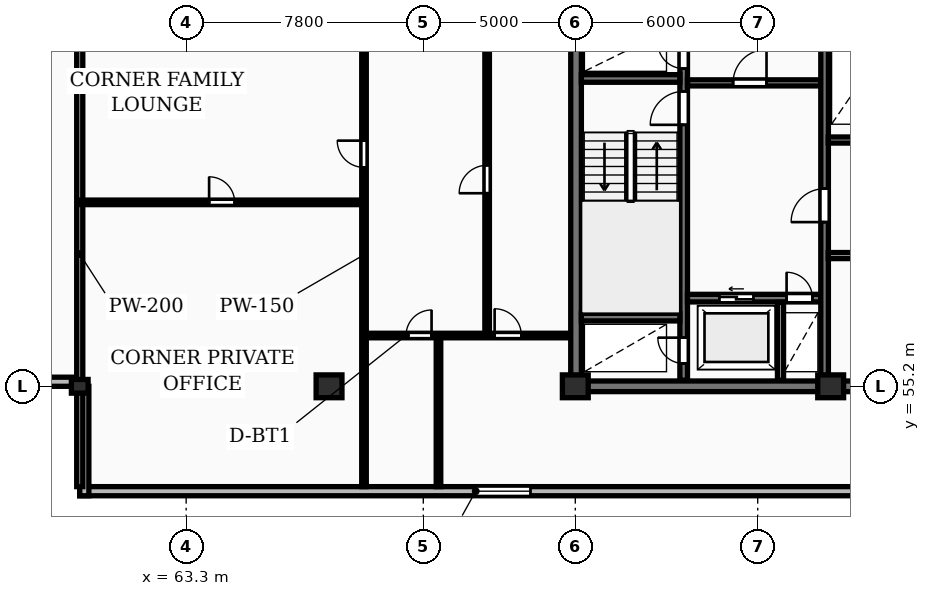
"""IFC4 building model, lengths in metres.
Left out: names, types, materials, properties, quantities, classifications, styles, units other than length and angle.
Written with IfcOpenShell. Run it as: python <this file> out.ifc"""

import sys

from ifc_helpers import new_model, si_unit, direction, frame, frame_2d, origin, origin_2d, place, context, subcontext, project, spatial, rectangle, extrude, element, fill, save


model = new_model("IFC4")
c1 = context("Model", 3, precision=1e-05, world=origin(), true_north=direction((0.0, 1.0)))
c2 = subcontext(c1, "Body", "Model", "MODEL_VIEW")
j1 = project(units=[si_unit("LENGTHUNIT", "METRE"), si_unit("PLANEANGLEUNIT", "RADIAN")], contexts=[c1])
p1 = place(None, origin())
s1 = spatial("IfcSite", under=j1, at=p1, CompositionType="ELEMENT")
p2 = place(p1, origin())
s2 = spatial("IfcBuilding", under=s1, at=p2, CompositionType="ELEMENT")
p3 = place(p2, frame((0.0, 0.0, 204.35)))
s3 = spatial("IfcBuildingStorey", under=s2, at=p3, CompositionType="ELEMENT", Elevation=204.35)
p4 = place(p3, frame((59.8, 55.2, 0.0), z_axis=(0.0, 0.0, 1.0), x_axis=(1.0, 0.0, 0.0)))
e1 = element("IfcColumn", 1, at=p4, inside=s3, PredefinedType="PILASTER", context=c2, shape_type="SweptSolid", body=[
    extrude(rectangle(XDim=0.55, YDim=0.45, at=origin_2d()), origin(), (0.0, 0.0, 1.0), 3.25),
])
for number, where, z_axis, x_axis in (
    (2, (68.0, 55.2, 0.0), (0.0, 0.0, 1.0), (1.0, 0.0, 0.0)),
    (3, (76.1, 55.2, 0.0), (0.0, 0.0, 1.0), (1.0, 0.0, 0.0)),
    (4, (84.5, 55.2, 0.0), (0.0, 0.0, 1.0), (1.0, 0.0, 0.0)),
):
    element("IfcColumn", number, at=place(p3, frame(where, z_axis=z_axis, x_axis=x_axis)), inside=s3, PredefinedType="COLUMN", context=c2, shape_type="SweptSolid", body=[
        extrude(rectangle(XDim=0.85, YDim=0.75, at=origin_2d()), origin(), (0.0, 0.0, 1.0), 3.25),
    ])
p5 = place(p3, frame((59.8, 51.75, 0.0), z_axis=(0.0, 0.0, 1.0), x_axis=(1.0, 0.0, 0.0)))
e5 = element("IfcWall", 5, at=p5, inside=s3, PredefinedType="STANDARD", context=c2, shape_type="SweptSolid", body=[
    extrude(rectangle(XDim=68.6, YDim=0.3, at=frame_2d((34.3, 0.0))), origin(), (0.0, 0.0, 1.0), 2.98),
])
p6 = place(p5, frame((13.025, 0.0, 0.85)))
e6 = element("IfcOpeningElement", 6, at=p6, cuts=e5, PredefinedType="OPENING", context=c2, shape_type="SweptSolid", body=[
    extrude(rectangle(XDim=1.8, YDim=1.8, at=frame_2d((0.9, 0.9))), frame((0.0, 0.16, 0.0), z_axis=(0.0, -1.0, 0.0), x_axis=(1.0, 0.0, 0.0)), (0.0, 0.0, 1.0), 0.32),
])
p7 = place(p5, frame((56.375, 0.0, 0.85)))
e7 = element("IfcOpeningElement", 7, at=p7, cuts=e5, PredefinedType="OPENING", context=c2, shape_type="SweptSolid", body=[
    extrude(rectangle(XDim=1.8, YDim=1.8, at=frame_2d((0.9, 0.9))), frame((0.0, 0.16, 0.0), z_axis=(0.0, -1.0, 0.0), x_axis=(1.0, 0.0, 0.0)), (0.0, 0.0, 1.0), 0.32),
])
p8 = place(p3, frame((56.2, 55.35, 0.0), z_axis=(0.0, 0.0, 1.0), x_axis=(1.0, 0.0, 0.0)))
e8 = element("IfcWall", 8, at=p8, inside=s3, PredefinedType="STANDARD", context=c2, shape_type="SweptSolid", body=[
    extrude(rectangle(XDim=3.6, YDim=0.3, at=frame_2d((1.8, 0.0))), origin(), (0.0, 0.0, 1.0), 2.98),
])
p9 = place(p3, frame((59.95, 55.2, 0.0), z_axis=(0.0, 0.0, 1.0), x_axis=(0.0, -1.0, 0.0)))
e9 = element("IfcWall", 9, at=p9, inside=s3, PredefinedType="STANDARD", context=c2, shape_type="SweptSolid", body=[
    extrude(rectangle(XDim=3.6, YDim=0.3, at=frame_2d((1.8, 0.0))), origin(), (0.0, 0.0, 1.0), 2.98),
])
p10 = place(p3, frame((75.95, 55.2, 0.0), z_axis=(0.0, 0.0, 1.0), x_axis=(1.0, 0.0, 0.0)))
e10 = element("IfcWall", 10, at=p10, inside=s3, PredefinedType="SHEAR", context=c2, shape_type="SweptSolid", body=[
    extrude(rectangle(XDim=36.3, YDim=0.35, at=frame_2d((18.15, 0.0))), origin(), (0.0, 0.0, 1.0), 3.25),
])
p11 = place(p3, frame((76.125, 55.375, 0.0), z_axis=(0.0, 0.0, 1.0), x_axis=(0.0, 1.0, 0.0)))
e11 = element("IfcWall", 11, at=p11, inside=s3, PredefinedType="SHEAR", context=c2, shape_type="SweptSolid", body=[
    extrude(rectangle(XDim=11.65, YDim=0.35, at=frame_2d((5.825, 0.0))), origin(), (0.0, 0.0, 1.0), 3.25),
])
p12 = place(p3, frame((79.665, 55.4, 0.0), z_axis=(0.0, 0.0, 1.0), x_axis=(0.0, 1.0, 0.0)))
e12 = element("IfcWall", 12, at=p12, inside=s3, PredefinedType="SHEAR", context=c2, shape_type="SweptSolid", body=[
    extrude(rectangle(XDim=11.6, YDim=0.25, at=frame_2d((5.8, 0.0))), origin(), (0.0, 0.0, 1.0), 3.25),
])
p13 = place(p12, frame((0.55, 0.0, 0.0)))
e13 = element("IfcOpeningElement", 13, at=p13, cuts=e12, PredefinedType="OPENING", context=c2, shape_type="SweptSolid", body=[
    extrude(rectangle(XDim=0.85, YDim=2.05, at=frame_2d((0.425, 1.025))), frame((0.0, 0.135, 0.0), z_axis=(0.0, -1.0, 0.0), x_axis=(1.0, 0.0, 0.0)), (0.0, 0.0, 1.0), 0.27),
])
p14 = place(p12, frame((8.4, 0.0, 0.0)))
e14 = element("IfcOpeningElement", 14, at=p14, cuts=e12, PredefinedType="OPENING", context=c2, shape_type="SweptSolid", body=[
    extrude(rectangle(XDim=1.1, YDim=2.1, at=frame_2d((0.55, 1.05))), frame((0.0, 0.135, 0.0), z_axis=(0.0, -1.0, 0.0), x_axis=(1.0, 0.0, 0.0)), (0.0, 0.0, 1.0), 0.27),
])
p15 = place(p12, frame((10.25, 0.0, 0.0)))
e15 = element("IfcOpeningElement", 15, at=p15, cuts=e12, PredefinedType="OPENING", context=c2, shape_type="SweptSolid", body=[
    extrude(rectangle(XDim=0.85, YDim=2.05, at=frame_2d((0.425, 1.025))), frame((0.0, 0.135, 0.0), z_axis=(0.0, -1.0, 0.0), x_axis=(1.0, 0.0, 0.0)), (0.0, 0.0, 1.0), 0.27),
])
for number, where, z_axis, x_axis in (
    (16, (76.3, 57.475, 0.0), (0.0, 0.0, 1.0), (1.0, 0.0, 0.0)),
    (17, (76.3, 65.325, 0.0), (0.0, 0.0, 1.0), (1.0, 0.0, 0.0)),
):
    element("IfcWall", number, at=place(p3, frame(where, z_axis=z_axis, x_axis=x_axis)), inside=s3, PredefinedType="SHEAR", context=c2, shape_type="SweptSolid", body=[
        extrude(rectangle(XDim=3.24, YDim=0.25, at=frame_2d((1.62, 0.0))), origin(), (0.0, 0.0, 1.0), 3.25),
    ])
p16 = place(p3, frame((79.79, 58.1, 0.0), z_axis=(0.0, 0.0, 1.0), x_axis=(1.0, 0.0, 0.0)))
e18 = element("IfcWall", 18, at=p16, inside=s3, PredefinedType="SHEAR", context=c2, shape_type="SweptSolid", body=[
    extrude(rectangle(XDim=4.39, YDim=0.25, at=frame_2d((2.195, 0.0))), origin(), (0.0, 0.0, 1.0), 3.25),
])
p17 = place(p16, frame((1.05, 0.0, 0.0)))
e19 = element("IfcOpeningElement", 19, at=p17, cuts=e18, PredefinedType="OPENING", context=c2, shape_type="SweptSolid", body=[
    extrude(rectangle(XDim=1.12, YDim=2.12, at=frame_2d((0.56, 1.06))), frame((0.0, 0.135, 0.0), z_axis=(0.0, -1.0, 0.0), x_axis=(1.0, 0.0, 0.0)), (0.0, 0.0, 1.0), 0.27),
])
p18 = place(p16, frame((3.26, 0.0, 0.0)))
e20 = element("IfcOpeningElement", 20, at=p18, cuts=e18, PredefinedType="OPENING", context=c2, shape_type="SweptSolid", body=[
    extrude(rectangle(XDim=0.85, YDim=2.05, at=frame_2d((0.425, 1.025))), frame((0.0, 0.135, 0.0), z_axis=(0.0, -1.0, 0.0), x_axis=(1.0, 0.0, 0.0)), (0.0, 0.0, 1.0), 0.27),
])
p19 = place(p3, frame((82.85, 55.4, 0.0), z_axis=(0.0, 0.0, 1.0), x_axis=(0.0, 1.0, 0.0)))
e21 = element("IfcWall", 21, at=p19, inside=s3, PredefinedType="PARTITIONING", context=c2, shape_type="SweptSolid", body=[
    extrude(rectangle(XDim=2.56, YDim=0.2, at=frame_2d((1.28, 0.0))), origin(), (0.0, 0.0, 1.0), 2.98),
])
p20 = place(p3, frame((79.79, 65.18, 0.0), z_axis=(0.0, 0.0, 1.0), x_axis=(1.0, 0.0, 0.0)))
e22 = element("IfcWall", 22, at=p20, inside=s3, PredefinedType="PARTITIONING", context=c2, shape_type="SweptSolid", body=[
    extrude(rectangle(XDim=4.39, YDim=0.2, at=frame_2d((2.195, 0.0))), origin(), (0.0, 0.0, 1.0), 2.98),
])
p21 = place(p20, frame((1.5, 0.0, 0.0)))
e23 = element("IfcOpeningElement", 23, at=p21, cuts=e22, PredefinedType="OPENING", context=c2, shape_type="SweptSolid", body=[
    extrude(rectangle(XDim=1.1, YDim=2.1, at=frame_2d((0.55, 1.05))), frame((0.0, 0.11, 0.0), z_axis=(0.0, -1.0, 0.0), x_axis=(1.0, 0.0, 0.0)), (0.0, 0.0, 1.0), 0.22),
])
p22 = place(p3, frame((84.3, 55.4, 0.0), z_axis=(0.0, 0.0, 1.0), x_axis=(0.0, 1.0, 0.0)))
e24 = element("IfcWall", 24, at=p22, inside=s3, PredefinedType="SHEAR", context=c2, shape_type="SweptSolid", body=[
    extrude(rectangle(XDim=11.6, YDim=0.25, at=frame_2d((5.8, 0.0))), origin(), (0.0, 0.0, 1.0), 3.25),
])
p23 = place(p22, frame((5.2, 0.0, 0.0)))
e25 = element("IfcOpeningElement", 25, at=p23, cuts=e24, PredefinedType="OPENING", context=c2, shape_type="SweptSolid", body=[
    extrude(rectangle(XDim=1.1, YDim=2.1, at=frame_2d((0.55, 1.05))), frame((0.0, 0.135, 0.0), z_axis=(0.0, -1.0, 0.0), x_axis=(1.0, 0.0, 0.0)), (0.0, 0.0, 1.0), 0.27),
])
p24 = place(p3, frame((84.42, 59.5, 0.0), z_axis=(0.0, 0.0, 1.0), x_axis=(1.0, 0.0, 0.0)))
e26 = element("IfcWall", 26, at=p24, inside=s3, PredefinedType="PARTITIONING", context=c2, shape_type="SweptSolid", body=[
    extrude(rectangle(XDim=8.36, YDim=0.2, at=frame_2d((4.18, 0.0))), origin(), (0.0, 0.0, 1.0), 2.98),
])
p25 = place(p24, frame((3.4, 0.0, 0.0)))
e27 = element("IfcOpeningElement", 27, at=p25, cuts=e26, PredefinedType="OPENING", context=c2, shape_type="SweptSolid", body=[
    extrude(rectangle(XDim=0.92, YDim=2.08, at=frame_2d((0.46, 1.04))), frame((0.0, 0.11, 0.0), z_axis=(0.0, -1.0, 0.0), x_axis=(1.0, 0.0, 0.0)), (0.0, 0.0, 1.0), 0.22),
])
p26 = place(p3, frame((84.42, 63.3, 0.0), z_axis=(0.0, 0.0, 1.0), x_axis=(1.0, 0.0, 0.0)))
e28 = element("IfcWall", 28, at=p26, inside=s3, PredefinedType="PARTITIONING", context=c2, shape_type="SweptSolid", body=[
    extrude(rectangle(XDim=19.83, YDim=0.2, at=frame_2d((9.915, 0.0))), origin(), (0.0, 0.0, 1.0), 2.98),
])
p27 = place(p26, frame((1.15, 0.0, 0.0)))
e29 = element("IfcOpeningElement", 29, at=p27, cuts=e28, PredefinedType="OPENING", context=c2, shape_type="SweptSolid", body=[
    extrude(rectangle(XDim=0.85, YDim=2.05, at=frame_2d((0.425, 1.025))), frame((0.0, 0.11, 0.0), z_axis=(0.0, -1.0, 0.0), x_axis=(1.0, 0.0, 0.0)), (0.0, 0.0, 1.0), 0.22),
])
p28 = place(p26, frame((3.25, 0.0, 0.0)))
e30 = element("IfcOpeningElement", 30, at=p28, cuts=e28, PredefinedType="OPENING", context=c2, shape_type="SweptSolid", body=[
    extrude(rectangle(XDim=0.85, YDim=2.05, at=frame_2d((0.425, 1.025))), frame((0.0, 0.11, 0.0), z_axis=(0.0, -1.0, 0.0), x_axis=(1.0, 0.0, 0.0)), (0.0, 0.0, 1.0), 0.22),
])
p29 = place(p26, frame((13.08, 0.0, 0.0)))
e31 = element("IfcOpeningElement", 31, at=p29, cuts=e28, PredefinedType="OPENING", context=c2, shape_type="SweptSolid", body=[
    extrude(rectangle(XDim=1.5, YDim=2.2, at=frame_2d((0.75, 1.1))), frame((0.0, 0.11, 0.0), z_axis=(0.0, -1.0, 0.0), x_axis=(1.0, 0.0, 0.0)), (0.0, 0.0, 1.0), 0.22),
])
p30 = place(p26, frame((6.68, 0.0, 0.0)))
e32 = element("IfcOpeningElement", 32, at=p30, cuts=e28, PredefinedType="OPENING", context=c2, shape_type="SweptSolid", body=[
    extrude(rectangle(XDim=0.92, YDim=2.08, at=frame_2d((0.46, 1.04))), frame((0.0, 0.11, 0.0), z_axis=(0.0, -1.0, 0.0), x_axis=(1.0, 0.0, 0.0)), (0.0, 0.0, 1.0), 0.22),
])
p31 = place(p26, frame((16.33, 0.0, 0.0)))
e33 = element("IfcOpeningElement", 33, at=p31, cuts=e28, PredefinedType="OPENING", context=c2, shape_type="SweptSolid", body=[
    extrude(rectangle(XDim=0.88, YDim=2.06, at=frame_2d((0.44, 1.03))), frame((0.0, 0.11, 0.0), z_axis=(0.0, -1.0, 0.0), x_axis=(1.0, 0.0, 0.0)), (0.0, 0.0, 1.0), 0.22),
])
p32 = place(p3, frame((59.8, 51.9, 0.0), z_axis=(0.0, 0.0, 1.0), x_axis=(0.0, 1.0, 0.0)))
e34 = element("IfcWall", 34, at=p32, inside=s3, PredefinedType="PARTITIONING", context=c2, shape_type="SweptSolid", body=[
    extrude(rectangle(XDim=15.3, YDim=0.2, at=frame_2d((7.65, 0.0))), origin(), (0.0, 0.0, 1.0), 2.287),
])
p33 = place(p3, frame((59.8, 61.25, 0.0), z_axis=(0.0, 0.0, 1.0), x_axis=(1.0, 0.0, 0.0)))
e35 = element("IfcWall", 35, at=p33, inside=s3, PredefinedType="PARTITIONING", context=c2, shape_type="SweptSolid", body=[
    extrude(rectangle(XDim=9.35, YDim=0.15, at=frame_2d((4.675, 0.0))), origin(), (0.0, 0.0, 1.0), 2.98),
])
p34 = place(p33, frame((4.255, 0.0, 0.0)))
e36 = element("IfcOpeningElement", 36, at=p34, cuts=e35, PredefinedType="OPENING", context=c2, shape_type="SweptSolid", body=[
    extrude(rectangle(XDim=0.84, YDim=2.04, at=frame_2d((0.42, 1.02))), frame((0.0, 0.085, 0.0), z_axis=(0.0, -1.0, 0.0), x_axis=(1.0, 0.0, 0.0)), (0.0, 0.0, 1.0), 0.17),
])
p35 = place(p3, frame((69.15, 51.9, 0.0), z_axis=(0.0, 0.0, 1.0), x_axis=(0.0, 1.0, 0.0)))
e37 = element("IfcWall", 37, at=p35, inside=s3, PredefinedType="PARTITIONING", context=c2, shape_type="SweptSolid", body=[
    extrude(rectangle(XDim=15.25, YDim=0.15, at=frame_2d((7.625, 0.0))), origin(), (0.0, 0.0, 1.0), 2.98),
])
p36 = place(p35, frame((10.5, 0.0, 0.0)))
e38 = element("IfcOpeningElement", 38, at=p36, cuts=e37, PredefinedType="OPENING", context=c2, shape_type="SweptSolid", body=[
    extrude(rectangle(XDim=0.88, YDim=2.06, at=frame_2d((0.44, 1.03))), frame((0.0, 0.085, 0.0), z_axis=(0.0, -1.0, 0.0), x_axis=(1.0, 0.0, 0.0)), (0.0, 0.0, 1.0), 0.17),
])
p37 = place(p3, frame((73.2, 56.87, 0.0), z_axis=(0.0, 0.0, 1.0), x_axis=(0.0, 1.0, 0.0)))
e39 = element("IfcWall", 39, at=p37, inside=s3, PredefinedType="PARTITIONING", context=c2, shape_type="SweptSolid", body=[
    extrude(rectangle(XDim=10.28, YDim=0.15, at=frame_2d((5.14, 0.0))), origin(), (0.0, 0.0, 1.0), 2.98),
])
p38 = place(p37, frame((4.68, 0.0, 0.0)))
e40 = element("IfcOpeningElement", 40, at=p38, cuts=e39, PredefinedType="OPENING", context=c2, shape_type="SweptSolid", body=[
    extrude(rectangle(XDim=0.92, YDim=2.08, at=frame_2d((0.46, 1.04))), frame((0.0, 0.085, 0.0), z_axis=(0.0, -1.0, 0.0), x_axis=(1.0, 0.0, 0.0)), (0.0, 0.0, 1.0), 0.17),
])
p39 = place(p3, frame((71.6, 51.9, 0.0), z_axis=(0.0, 0.0, 1.0), x_axis=(0.0, 1.0, 0.0)))
e41 = element("IfcWall", 41, at=p39, inside=s3, PredefinedType="PARTITIONING", context=c2, shape_type="SweptSolid", body=[
    extrude(rectangle(XDim=4.97, YDim=0.15, at=frame_2d((2.485, 0.0))), origin(), (0.0, 0.0, 1.0), 2.98),
])
p40 = place(p3, frame((69.17, 56.87, 0.0), z_axis=(0.0, 0.0, 1.0), x_axis=(1.0, 0.0, 0.0)))
e42 = element("IfcWall", 42, at=p40, inside=s3, PredefinedType="PARTITIONING", context=c2, shape_type="SweptSolid", body=[
    extrude(rectangle(XDim=6.76, YDim=0.15, at=frame_2d((3.38, 0.0))), origin(), (0.0, 0.0, 1.0), 2.98),
])
p41 = place(p40, frame((1.362, 0.0, 0.0)))
e43 = element("IfcOpeningElement", 43, at=p41, cuts=e42, PredefinedType="OPENING", context=c2, shape_type="SweptSolid", body=[
    extrude(rectangle(XDim=0.84, YDim=2.04, at=frame_2d((0.42, 1.02))), frame((0.0, 0.085, 0.0), z_axis=(0.0, -1.0, 0.0), x_axis=(1.0, 0.0, 0.0)), (0.0, 0.0, 1.0), 0.17),
])
p42 = place(p40, frame((4.277, 0.0, 0.0)))
e44 = element("IfcOpeningElement", 44, at=p42, cuts=e42, PredefinedType="OPENING", context=c2, shape_type="SweptSolid", body=[
    extrude(rectangle(XDim=0.88, YDim=2.06, at=frame_2d((0.44, 1.03))), frame((0.0, 0.085, 0.0), z_axis=(0.0, -1.0, 0.0), x_axis=(1.0, 0.0, 0.0)), (0.0, 0.0, 1.0), 0.17),
])
p43 = place(p6, origin())
e45 = element("IfcWindow", 45, at=p43, inside=s3, PartitioningType="SINGLE_PANEL", PredefinedType="WINDOW", context=c2, shape_type="SweptSolid", body=[
    extrude(rectangle(XDim=1.8, YDim=1.8, at=frame_2d((0.9, 0.9))), frame((0.0, 0.03, 0.0), z_axis=(0.0, -1.0, 0.0), x_axis=(1.0, 0.0, 0.0)), (0.0, 0.0, 1.0), 0.06),
])
fill(e6, e45)
p44 = place(p13, origin())
e46 = element("IfcDoor", 46, at=p44, inside=s3, OperationType="SINGLE_SWING_RIGHT", PredefinedType="DOOR", context=c2, shape_type="SweptSolid", body=[
    extrude(rectangle(XDim=0.85, YDim=2.05, at=frame_2d((0.425, 1.025))), frame((0.0, 0.025, 0.0), z_axis=(0.0, -1.0, 0.0), x_axis=(1.0, 0.0, 0.0)), (0.0, 0.0, 1.0), 0.05),
])
fill(e13, e46)
p45 = place(p14, origin())
e47 = element("IfcDoor", 47, at=p45, inside=s3, OperationType="SINGLE_SWING_LEFT", PredefinedType="DOOR", context=c2, shape_type="SweptSolid", body=[
    extrude(rectangle(XDim=1.1, YDim=2.1, at=frame_2d((0.55, 1.05))), frame((0.0, 0.025, 0.0), z_axis=(0.0, -1.0, 0.0), x_axis=(1.0, 0.0, 0.0)), (0.0, 0.0, 1.0), 0.05),
])
fill(e14, e47)
p46 = place(p15, origin())
e48 = element("IfcDoor", 48, at=p46, inside=s3, OperationType="SINGLE_SWING_RIGHT", PredefinedType="DOOR", context=c2, shape_type="SweptSolid", body=[
    extrude(rectangle(XDim=0.85, YDim=2.05, at=frame_2d((0.425, 1.025))), frame((0.0, 0.025, 0.0), z_axis=(0.0, -1.0, 0.0), x_axis=(1.0, 0.0, 0.0)), (0.0, 0.0, 1.0), 0.05),
])
fill(e15, e48)
p47 = place(p17, origin())
e49 = element("IfcDoor", 49, at=p47, inside=s3, OperationType="SLIDING_TO_LEFT", PredefinedType="DOOR", context=c2, shape_type="SweptSolid", body=[
    extrude(rectangle(XDim=1.12, YDim=2.12, at=frame_2d((0.56, 1.06))), frame((0.0, 0.025, 0.0), z_axis=(0.0, -1.0, 0.0), x_axis=(1.0, 0.0, 0.0)), (0.0, 0.0, 1.0), 0.05),
])
fill(e19, e49)
p48 = place(p18, origin())
e50 = element("IfcDoor", 50, at=p48, inside=s3, OperationType="SINGLE_SWING_LEFT", PredefinedType="DOOR", context=c2, shape_type="SweptSolid", body=[
    extrude(rectangle(XDim=0.85, YDim=2.05, at=frame_2d((0.425, 1.025))), frame((0.0, 0.025, 0.0), z_axis=(0.0, -1.0, 0.0), x_axis=(1.0, 0.0, 0.0)), (0.0, 0.0, 1.0), 0.05),
])
fill(e20, e50)
p49 = place(p21, origin())
e51 = element("IfcDoor", 51, at=p49, inside=s3, OperationType="SINGLE_SWING_RIGHT", PredefinedType="DOOR", context=c2, shape_type="SweptSolid", body=[
    extrude(rectangle(XDim=1.1, YDim=2.1, at=frame_2d((0.55, 1.05))), frame((0.0, 0.025, 0.0), z_axis=(0.0, -1.0, 0.0), x_axis=(1.0, 0.0, 0.0)), (0.0, 0.0, 1.0), 0.05),
])
fill(e23, e51)
p50 = place(p23, origin())
e52 = element("IfcDoor", 52, at=p50, inside=s3, OperationType="SINGLE_SWING_LEFT", PredefinedType="DOOR", context=c2, shape_type="SweptSolid", body=[
    extrude(rectangle(XDim=1.1, YDim=2.1, at=frame_2d((0.55, 1.05))), frame((0.0, 0.025, 0.0), z_axis=(0.0, -1.0, 0.0), x_axis=(1.0, 0.0, 0.0)), (0.0, 0.0, 1.0), 0.05),
])
fill(e25, e52)
p51 = place(p34, origin())
e53 = element("IfcDoor", 53, at=p51, inside=s3, OperationType="SINGLE_SWING_LEFT", PredefinedType="DOOR", context=c2, shape_type="SweptSolid", body=[
    extrude(rectangle(XDim=0.84, YDim=2.04, at=frame_2d((0.42, 1.02))), frame((0.0, 0.025, 0.0), z_axis=(0.0, -1.0, 0.0), x_axis=(1.0, 0.0, 0.0)), (0.0, 0.0, 1.0), 0.05),
])
fill(e36, e53)
p52 = place(p36, origin())
e54 = element("IfcDoor", 54, at=p52, inside=s3, OperationType="SINGLE_SWING_RIGHT", PredefinedType="DOOR", context=c2, shape_type="SweptSolid", body=[
    extrude(rectangle(XDim=0.88, YDim=2.06, at=frame_2d((0.44, 1.03))), frame((0.0, 0.025, 0.0), z_axis=(0.0, -1.0, 0.0), x_axis=(1.0, 0.0, 0.0)), (0.0, 0.0, 1.0), 0.05),
])
fill(e38, e54)
p53 = place(p38, origin())
e55 = element("IfcDoor", 55, at=p53, inside=s3, OperationType="SINGLE_SWING_LEFT", PredefinedType="DOOR", context=c2, shape_type="SweptSolid", body=[
    extrude(rectangle(XDim=0.92, YDim=2.08, at=frame_2d((0.46, 1.04))), frame((0.0, 0.025, 0.0), z_axis=(0.0, -1.0, 0.0), x_axis=(1.0, 0.0, 0.0)), (0.0, 0.0, 1.0), 0.05),
])
fill(e40, e55)
p54 = place(p41, origin())
e56 = element("IfcDoor", 56, at=p54, inside=s3, OperationType="SINGLE_SWING_RIGHT", PredefinedType="DOOR", context=c2, shape_type="SweptSolid", body=[
    extrude(rectangle(XDim=0.84, YDim=2.04, at=frame_2d((0.42, 1.02))), frame((0.0, 0.025, 0.0), z_axis=(0.0, -1.0, 0.0), x_axis=(1.0, 0.0, 0.0)), (0.0, 0.0, 1.0), 0.05),
])
fill(e43, e56)
p55 = place(p42, origin())
e57 = element("IfcDoor", 57, at=p55, inside=s3, OperationType="SINGLE_SWING_LEFT", PredefinedType="DOOR", context=c2, shape_type="SweptSolid", body=[
    extrude(rectangle(XDim=0.88, YDim=2.06, at=frame_2d((0.44, 1.03))), frame((0.0, 0.025, 0.0), z_axis=(0.0, -1.0, 0.0), x_axis=(1.0, 0.0, 0.0)), (0.0, 0.0, 1.0), 0.05),
])
fill(e44, e57)
save(model, sys.argv[1])
